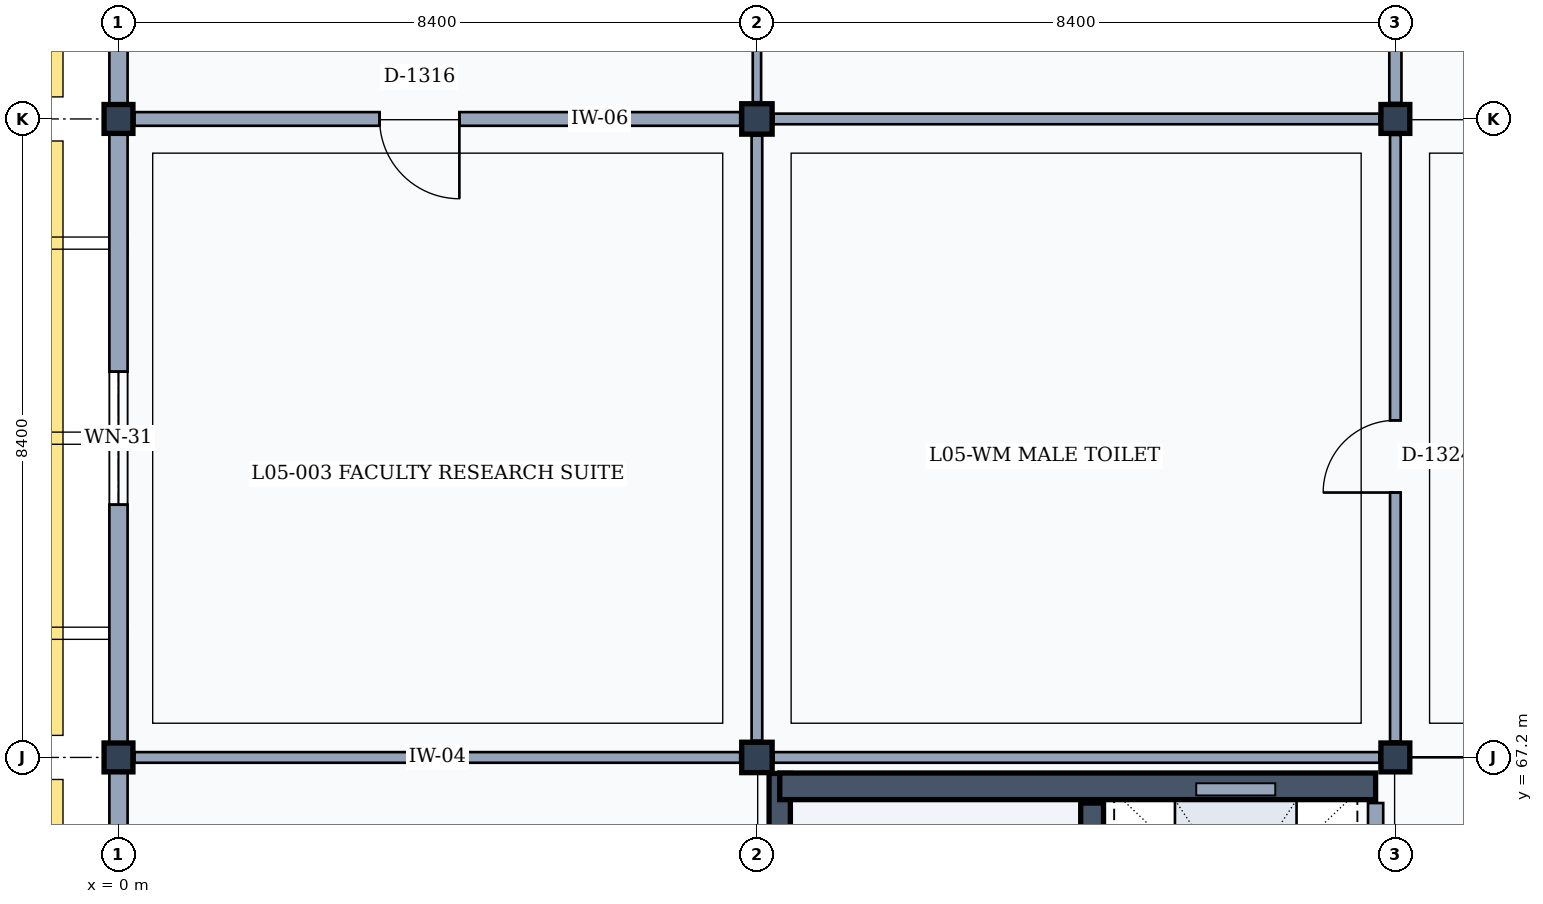
"""IFC4 building model, lengths in metres.
Left out: names, types, materials, properties, quantities, classifications, styles, units other than length and angle.
Written with IfcOpenShell. Run it as: python <this file> out.ifc"""

import sys

from ifc_helpers import new_model, si_unit, direction, frame, frame_2d, origin, origin_2d, place, context, subcontext, project, spatial, rectangle, extrude, element, fill, save


model = new_model("IFC4")
c1 = context("Model", 3, precision=1e-05, world=origin(), true_north=direction((0.0, 1.0)))
c2 = subcontext(c1, "Body", "Model", "MODEL_VIEW")
j1 = project(units=[si_unit("LENGTHUNIT", "METRE"), si_unit("PLANEANGLEUNIT", "RADIAN")], contexts=[c1])
p1 = place(None, origin())
s1 = spatial("IfcSite", under=j1, at=p1, CompositionType="ELEMENT")
p2 = place(p1, origin())
s2 = spatial("IfcBuilding", under=s1, at=p2, CompositionType="ELEMENT")
p3 = place(p2, frame((0.0, 0.0, 22.2)))
s3 = spatial("IfcBuildingStorey", under=s2, at=p3, CompositionType="ELEMENT", Elevation=22.2)
for number, where, z_axis, x_axis in (
    (1, (0.0, 67.2, 0.0), (0.0, 0.0, 1.0), (1.0, 0.0, 0.0)),
    (2, (0.0, 75.6, 0.0), (0.0, 0.0, 1.0), (1.0, 0.0, 0.0)),
):
    element("IfcColumn", number, at=place(p3, frame(where, z_axis=z_axis, x_axis=x_axis)), inside=s3, PredefinedType="COLUMN", context=c2, shape_type="SweptSolid", body=[
        extrude(rectangle(XDim=0.38, YDim=0.38, at=origin_2d()), origin(), (0.0, 0.0, 1.0), 4.2),
    ])
for number, where, z_axis, x_axis in (
    (3, (8.4, 67.2, 0.0), (0.0, 0.0, 1.0), (1.0, 0.0, 0.0)),
    (4, (8.4, 75.6, 0.0), (0.0, 0.0, 1.0), (1.0, 0.0, 0.0)),
):
    element("IfcColumn", number, at=place(p3, frame(where, z_axis=z_axis, x_axis=x_axis)), inside=s3, PredefinedType="COLUMN", context=c2, shape_type="SweptSolid", body=[
        extrude(rectangle(XDim=0.4, YDim=0.4, at=origin_2d()), origin(), (0.0, 0.0, 1.0), 4.2),
    ])
for number, where, z_axis, x_axis in (
    (5, (16.8, 67.2, 0.0), (0.0, 0.0, 1.0), (1.0, 0.0, 0.0)),
    (6, (16.8, 75.6, 0.0), (0.0, 0.0, 1.0), (1.0, 0.0, 0.0)),
):
    element("IfcColumn", number, at=place(p3, frame(where, z_axis=z_axis, x_axis=x_axis)), inside=s3, PredefinedType="COLUMN", context=c2, shape_type="SweptSolid", body=[
        extrude(rectangle(XDim=0.38, YDim=0.38, at=origin_2d()), origin(), (0.0, 0.0, 1.0), 4.2),
    ])
p4 = place(p3, frame((0.0, 58.99, 0.0), z_axis=(0.0, 0.0, 1.0), x_axis=(0.0, 1.0, 0.0)))
e7 = element("IfcWall", 7, at=p4, inside=s3, PredefinedType="SOLIDWALL", context=c2, shape_type="SweptSolid", body=[
    extrude(rectangle(XDim=8.02, YDim=0.24, at=frame_2d((4.01, 0.0))), origin(), (0.0, 0.0, 1.0), 3.36),
])
p5 = place(p4, frame((2.635, 0.0, 0.9)))
e8 = element("IfcOpeningElement", 8, at=p5, cuts=e7, PredefinedType="OPENING", context=c2, shape_type="SweptSolid", body=[
    extrude(rectangle(XDim=2.75, YDim=1.85, at=frame_2d((1.375, 0.925))), frame((0.0, 0.13, 0.0), z_axis=(0.0, -1.0, 0.0), x_axis=(1.0, 0.0, 0.0)), (0.0, 0.0, 1.0), 0.26),
])
p6 = place(p3, frame((0.0, 67.39, 0.0), z_axis=(0.0, 0.0, 1.0), x_axis=(0.0, 1.0, 0.0)))
e9 = element("IfcWall", 9, at=p6, inside=s3, PredefinedType="SOLIDWALL", context=c2, shape_type="SweptSolid", body=[
    extrude(rectangle(XDim=8.02, YDim=0.24, at=frame_2d((4.01, 0.0))), origin(), (0.0, 0.0, 1.0), 3.36),
])
p7 = place(p6, frame((3.135, 0.0, 0.9)))
e10 = element("IfcOpeningElement", 10, at=p7, cuts=e9, PredefinedType="OPENING", context=c2, shape_type="SweptSolid", body=[
    extrude(rectangle(XDim=1.75, YDim=1.85, at=frame_2d((0.875, 0.925))), frame((0.0, 0.13, 0.0), z_axis=(0.0, -1.0, 0.0), x_axis=(1.0, 0.0, 0.0)), (0.0, 0.0, 1.0), 0.26),
])
p8 = place(p3, frame((0.0, 75.79, 0.0), z_axis=(0.0, 0.0, 1.0), x_axis=(0.0, 1.0, 0.0)))
e11 = element("IfcWall", 11, at=p8, inside=s3, PredefinedType="SOLIDWALL", context=c2, shape_type="SweptSolid", body=[
    extrude(rectangle(XDim=8.02, YDim=0.24, at=frame_2d((4.01, 0.0))), origin(), (0.0, 0.0, 1.0), 3.36),
])
p9 = place(p8, frame((2.785, 0.0, 0.9)))
e12 = element("IfcOpeningElement", 12, at=p9, cuts=e11, PredefinedType="OPENING", context=c2, shape_type="SweptSolid", body=[
    extrude(rectangle(XDim=2.45, YDim=1.9, at=frame_2d((1.225, 0.95))), frame((0.0, 0.13, 0.0), z_axis=(0.0, -1.0, 0.0), x_axis=(1.0, 0.0, 0.0)), (0.0, 0.0, 1.0), 0.26),
])
p10 = place(p3, frame((8.7, 59.05, 0.0), z_axis=(0.0, 0.0, 1.0), x_axis=(0.0, 1.0, 0.0)))
e13 = element("IfcWall", 13, at=p10, inside=s3, PredefinedType="SHEAR", context=c2, shape_type="SweptSolid", body=[
    extrude(rectangle(XDim=7.94, YDim=0.28, at=frame_2d((3.97, 0.0))), origin(), (0.0, 0.0, 1.0), 3.98),
])
p11 = place(p3, frame((8.7, 66.82, 0.0), z_axis=(0.0, 0.0, 1.0), x_axis=(1.0, 0.0, 0.0)))
e14 = element("IfcWall", 14, at=p11, inside=s3, PredefinedType="SHEAR", context=c2, shape_type="SweptSolid", body=[
    extrude(rectangle(XDim=7.84, YDim=0.35, at=frame_2d((3.92, 0.0))), origin(), (0.0, 0.0, 1.0), 3.98),
])
p12 = place(p3, frame((16.54, 66.6, 0.0), z_axis=(0.0, 0.0, 1.0), x_axis=(0.0, -1.0, 0.0)))
e15 = element("IfcWall", 15, at=p12, inside=s3, PredefinedType="PARTITIONING", context=c2, shape_type="SweptSolid", body=[
    extrude(rectangle(XDim=7.2, YDim=0.2, at=frame_2d((3.6, 0.0))), origin(), (0.0, 0.0, 1.0), 3.32),
])
p13 = place(p12, frame((3.55, 0.0, 0.0)))
e16 = element("IfcOpeningElement", 16, at=p13, cuts=e15, PredefinedType="OPENING", context=c2, shape_type="SweptSolid", body=[
    extrude(rectangle(XDim=1.1, YDim=2.15, at=frame_2d((0.55, 1.075))), frame((0.0, 0.11, 0.0), z_axis=(0.0, -1.0, 0.0), x_axis=(1.0, 0.0, 0.0)), (0.0, 0.0, 1.0), 0.22),
])
p14 = place(p3, frame((12.81, 59.22, 0.0), z_axis=(0.0, 0.0, 1.0), x_axis=(0.0, 1.0, 0.0)))
e17 = element("IfcWall", 17, at=p14, inside=s3, PredefinedType="SHEAR", context=c2, shape_type="SweptSolid", body=[
    extrude(rectangle(XDim=7.38, YDim=0.3, at=frame_2d((3.69, 0.0))), origin(), (0.0, 0.0, 1.0), 3.98),
])
p15 = place(p14, frame((0.28, 0.0, 0.0)))
e18 = element("IfcOpeningElement", 18, at=p15, cuts=e17, PredefinedType="OPENING", context=c2, shape_type="SweptSolid", body=[
    extrude(rectangle(XDim=1.1, YDim=2.15, at=frame_2d((0.55, 1.075))), frame((0.0, 0.16, 0.0), z_axis=(0.0, -1.0, 0.0), x_axis=(1.0, 0.0, 0.0)), (0.0, 0.0, 1.0), 0.32),
])
p16 = place(p3, frame((0.21, 67.2, 0.0), z_axis=(0.0, 0.0, 1.0), x_axis=(1.0, 0.0, 0.0)))
e19 = element("IfcWall", 19, at=p16, inside=s3, PredefinedType="PARTITIONING", context=c2, shape_type="SweptSolid", body=[
    extrude(rectangle(XDim=7.97, YDim=0.14, at=frame_2d((3.985, 0.0))), origin(), (0.0, 0.0, 1.0), 3.32),
])
p17 = place(p3, frame((8.4, 67.42, 0.0), z_axis=(0.0, 0.0, 1.0), x_axis=(0.0, 1.0, 0.0)))
e20 = element("IfcWall", 20, at=p17, inside=s3, PredefinedType="PARTITIONING", context=c2, shape_type="SweptSolid", body=[
    extrude(rectangle(XDim=7.96, YDim=0.14, at=frame_2d((3.98, 0.0))), origin(), (0.0, 0.0, 1.0), 3.32),
])
p18 = place(p3, frame((0.21, 75.6, 0.0), z_axis=(0.0, 0.0, 1.0), x_axis=(1.0, 0.0, 0.0)))
e21 = element("IfcWall", 21, at=p18, inside=s3, PredefinedType="PARTITIONING", context=c2, shape_type="SweptSolid", body=[
    extrude(rectangle(XDim=7.97, YDim=0.18, at=frame_2d((3.985, 0.0))), origin(), (0.0, 0.0, 1.0), 3.32),
])
p19 = place(p18, frame((3.225, 0.0, 0.0)))
e22 = element("IfcOpeningElement", 22, at=p19, cuts=e21, PredefinedType="OPENING", context=c2, shape_type="SweptSolid", body=[
    extrude(rectangle(XDim=1.05, YDim=2.2, at=frame_2d((0.525, 1.1))), frame((0.0, 0.1, 0.0), z_axis=(0.0, -1.0, 0.0), x_axis=(1.0, 0.0, 0.0)), (0.0, 0.0, 1.0), 0.2),
])
p20 = place(p3, frame((8.4, 75.82, 0.0), z_axis=(0.0, 0.0, 1.0), x_axis=(0.0, 1.0, 0.0)))
e23 = element("IfcWall", 23, at=p20, inside=s3, PredefinedType="PARTITIONING", context=c2, shape_type="SweptSolid", body=[
    extrude(rectangle(XDim=7.96, YDim=0.11, at=frame_2d((3.98, 0.0))), origin(), (0.0, 0.0, 1.0), 3.32),
])
p21 = place(p20, frame((3.175, 0.0, 0.0)))
e24 = element("IfcOpeningElement", 24, at=p21, cuts=e23, PredefinedType="OPENING", context=c2, shape_type="SweptSolid", body=[
    extrude(rectangle(XDim=1.15, YDim=2.25, at=frame_2d((0.575, 1.125))), frame((0.0, 0.065, 0.0), z_axis=(0.0, -1.0, 0.0), x_axis=(1.0, 0.0, 0.0)), (0.0, 0.0, 1.0), 0.13),
])
p22 = place(p3, frame((8.62, 67.2, 0.0), z_axis=(0.0, 0.0, 1.0), x_axis=(1.0, 0.0, 0.0)))
e25 = element("IfcWall", 25, at=p22, inside=s3, PredefinedType="PARTITIONING", context=c2, shape_type="SweptSolid", body=[
    extrude(rectangle(XDim=7.97, YDim=0.14, at=frame_2d((3.985, 0.0))), origin(), (0.0, 0.0, 1.0), 3.32),
])
p23 = place(p3, frame((16.8, 67.41, 0.0), z_axis=(0.0, 0.0, 1.0), x_axis=(0.0, 1.0, 0.0)))
e26 = element("IfcWall", 26, at=p23, inside=s3, PredefinedType="PARTITIONING", context=c2, shape_type="SweptSolid", body=[
    extrude(rectangle(XDim=7.98, YDim=0.14, at=frame_2d((3.99, 0.0))), origin(), (0.0, 0.0, 1.0), 3.32),
])
p24 = place(p23, frame((3.275, 0.0, 0.0)))
e27 = element("IfcOpeningElement", 27, at=p24, cuts=e26, PredefinedType="OPENING", context=c2, shape_type="SweptSolid", body=[
    extrude(rectangle(XDim=0.95, YDim=2.15, at=frame_2d((0.475, 1.075))), frame((0.0, 0.08, 0.0), z_axis=(0.0, -1.0, 0.0), x_axis=(1.0, 0.0, 0.0)), (0.0, 0.0, 1.0), 0.16),
])
p25 = place(p3, frame((8.62, 75.6, 0.0), z_axis=(0.0, 0.0, 1.0), x_axis=(1.0, 0.0, 0.0)))
e28 = element("IfcWall", 28, at=p25, inside=s3, PredefinedType="PARTITIONING", context=c2, shape_type="SweptSolid", body=[
    extrude(rectangle(XDim=7.97, YDim=0.14, at=frame_2d((3.985, 0.0))), origin(), (0.0, 0.0, 1.0), 3.32),
])
p26 = place(p3, frame((16.8, 75.81, 0.0), z_axis=(0.0, 0.0, 1.0), x_axis=(0.0, 1.0, 0.0)))
e29 = element("IfcWall", 29, at=p26, inside=s3, PredefinedType="PARTITIONING", context=c2, shape_type="SweptSolid", body=[
    extrude(rectangle(XDim=7.98, YDim=0.16, at=frame_2d((3.99, 0.0))), origin(), (0.0, 0.0, 1.0), 3.32),
])
p27 = place(p26, frame((3.025, 0.0, 0.0)))
e30 = element("IfcOpeningElement", 30, at=p27, cuts=e29, PredefinedType="OPENING", context=c2, shape_type="SweptSolid", body=[
    extrude(rectangle(XDim=1.45, YDim=2.35, at=frame_2d((0.725, 1.175))), frame((0.0, 0.09, 0.0), z_axis=(0.0, -1.0, 0.0), x_axis=(1.0, 0.0, 0.0)), (0.0, 0.0, 1.0), 0.18),
])
p28 = place(p7, origin())
e31 = element("IfcWindow", 31, at=p28, inside=s3, PartitioningType="SINGLE_PANEL", PredefinedType="WINDOW", context=c2, shape_type="SweptSolid", body=[
    extrude(rectangle(XDim=1.75, YDim=1.85, at=frame_2d((0.875, 0.925))), frame((0.0, 0.03, 0.0), z_axis=(0.0, -1.0, 0.0), x_axis=(1.0, 0.0, 0.0)), (0.0, 0.0, 1.0), 0.06),
])
fill(e10, e31)
p29 = place(p19, frame((1.05, 0.0, 0.0), z_axis=(0.0, 0.0, 1.0), x_axis=(-1.0, 0.0, 0.0)))
e32 = element("IfcDoor", 32, at=p29, inside=s3, OperationType="SINGLE_SWING_LEFT", PredefinedType="DOOR", context=c2, shape_type="SweptSolid", body=[
    extrude(rectangle(XDim=1.05, YDim=2.2, at=frame_2d((0.525, 1.1))), frame((0.0, 0.025, 0.0), z_axis=(0.0, -1.0, 0.0), x_axis=(1.0, 0.0, 0.0)), (0.0, 0.0, 1.0), 0.05),
])
fill(e22, e32)
p30 = place(p24, origin())
e33 = element("IfcDoor", 33, at=p30, inside=s3, OperationType="SINGLE_SWING_LEFT", PredefinedType="DOOR", context=c2, shape_type="SweptSolid", body=[
    extrude(rectangle(XDim=0.95, YDim=2.15, at=frame_2d((0.475, 1.075))), frame((0.0, 0.025, 0.0), z_axis=(0.0, -1.0, 0.0), x_axis=(1.0, 0.0, 0.0)), (0.0, 0.0, 1.0), 0.05),
])
fill(e27, e33)
save(model, sys.argv[1])
